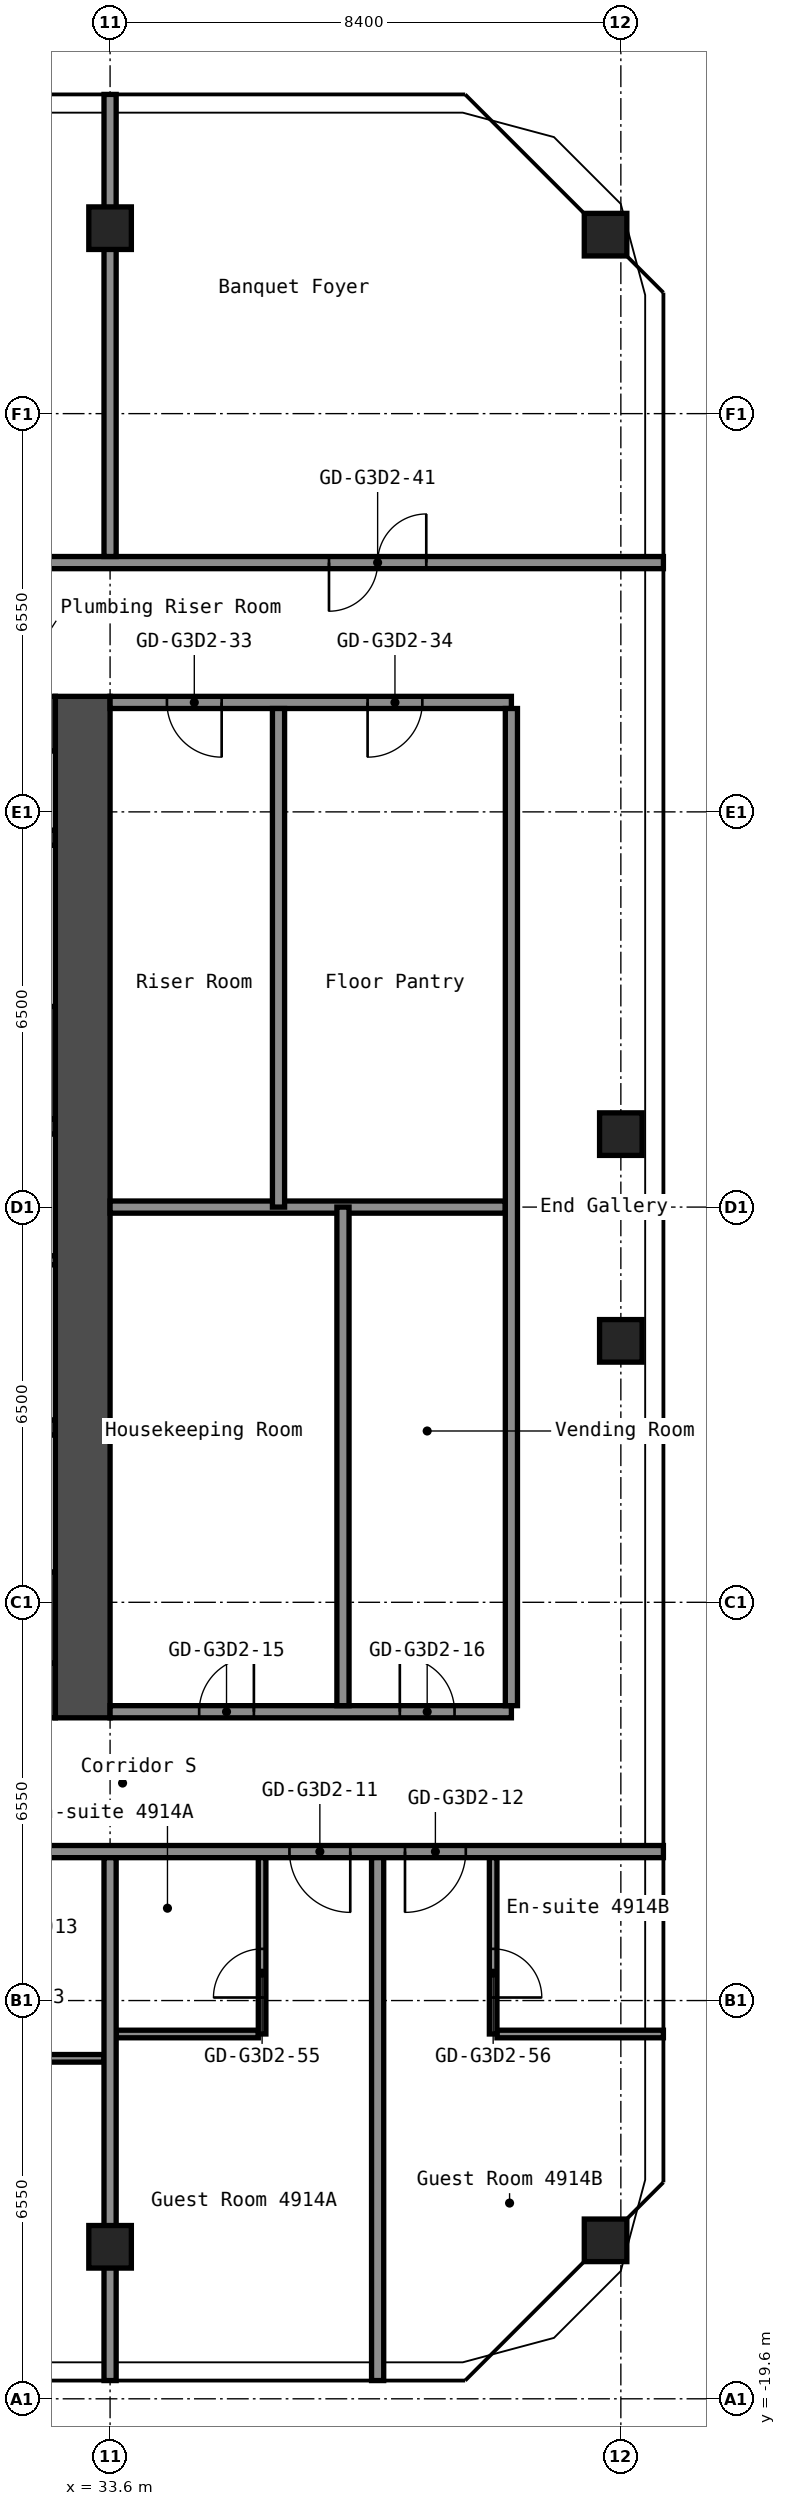
"""IFC4 building model, lengths in metres.
Left out: names, types, materials, properties, quantities, classifications, styles, units other than length and angle.
Written with IfcOpenShell. Run it as: python <this file> out.ifc"""

import sys

from ifc_helpers import new_model, si_unit, direction, frame, frame_2d, origin, origin_2d, place, context, subcontext, project, spatial, rectangle, hollow_rectangle, extrude, element, fill, save


model = new_model("IFC4")
c1 = context("Model", 3, precision=1e-05, world=origin(), true_north=direction((0.0, 1.0)))
c2 = subcontext(c1, "Body", "Model", "MODEL_VIEW")
j1 = project(units=[si_unit("LENGTHUNIT", "METRE"), si_unit("PLANEANGLEUNIT", "RADIAN")], contexts=[c1])
p1 = place(None, origin())
s1 = spatial("IfcSite", under=j1, at=p1, CompositionType="ELEMENT")
p2 = place(p1, origin())
s2 = spatial("IfcBuilding", under=s1, at=p2, CompositionType="ELEMENT")
p3 = place(p2, frame((0.0, 0.0, 172.6)))
s3 = spatial("IfcBuildingStorey", under=s2, at=p3, CompositionType="ELEMENT", Elevation=172.6)
for number, where, z_axis, x_axis in (
    (1, (33.6, -17.1, 0.0), (0.0, 0.0, 1.0), (1.0, 0.0, 0.0)),
    (2, (33.6, 16.1, 0.0), (0.0, 0.0, 1.0), (1.0, 0.0, 0.0)),
    (3, (41.749, -16.994, 0.0), (0.0, 0.0, 1.0), (1.0, 0.0, 0.0)),
    (4, (42.0, -2.2, 0.0), (0.0, 0.0, 1.0), (1.0, 0.0, 0.0)),
    (5, (42.0, 1.2, 0.0), (0.0, 0.0, 1.0), (1.0, 0.0, 0.0)),
    (6, (41.749, 15.994, 0.0), (0.0, 0.0, 1.0), (1.0, 0.0, 0.0)),
):
    element("IfcColumn", number, at=place(p3, frame(where, z_axis=z_axis, x_axis=x_axis)), inside=s3, PredefinedType="COLUMN", context=c2, shape_type="SweptSolid", body=[
        extrude(hollow_rectangle(XDim=0.7, YDim=0.7, WallThickness=0.028, at=origin_2d()), origin(), (0.0, 0.0, 1.0), 2.9),
    ])
p4 = place(p3, frame((33.15, -8.4, 0.0), z_axis=(0.0, 0.0, 1.0), x_axis=(0.0, 1.0, 0.0)))
e7 = element("IfcWall", 7, at=p4, inside=s3, PredefinedType="SHEAR", context=c2, shape_type="SweptSolid", body=[
    extrude(rectangle(XDim=16.8, YDim=0.9, at=frame_2d((8.4, 0.0))), origin(), (0.0, 0.0, 1.0), 2.9),
])
p5 = place(p3, frame((17.7, 7.95, 0.0), z_axis=(0.0, 0.0, 1.0), x_axis=(1.0, 0.0, 0.0)))
e8 = element("IfcWall", 8, at=p5, inside=s3, PredefinedType="SHEAR", context=c2, shape_type="SweptSolid", body=[
    extrude(rectangle(XDim=15.0, YDim=0.9, at=frame_2d((7.5, 0.0))), origin(), (0.0, 0.0, 1.0), 2.9),
])
p6 = place(p5, frame((10.4, 0.0, 0.0)))
e9 = element("IfcOpeningElement", 9, at=p6, cuts=e8, PredefinedType="OPENING", context=c2, shape_type="SweptSolid", body=[
    extrude(rectangle(XDim=1.2, YDim=2.1, at=frame_2d((0.6, 1.05))), frame((0.0, 0.46, 0.0), z_axis=(0.0, -1.0, 0.0), x_axis=(1.0, 0.0, 0.0)), (0.0, 0.0, 1.0), 0.92),
])
p7 = place(p5, frame((13.35, 0.0, 0.0)))
e10 = element("IfcOpeningElement", 10, at=p7, cuts=e8, PredefinedType="OPENING", context=c2, shape_type="SweptSolid", body=[
    extrude(rectangle(XDim=0.9, YDim=2.1, at=frame_2d((0.45, 1.05))), frame((0.0, 0.46, 0.0), z_axis=(0.0, -1.0, 0.0), x_axis=(1.0, 0.0, 0.0)), (0.0, 0.0, 1.0), 0.92),
])
p8 = place(p3, frame((17.7, -7.95, 0.0), z_axis=(0.0, 0.0, 1.0), x_axis=(1.0, 0.0, 0.0)))
e11 = element("IfcWall", 11, at=p8, inside=s3, PredefinedType="SHEAR", context=c2, shape_type="SweptSolid", body=[
    extrude(rectangle(XDim=15.0, YDim=0.9, at=frame_2d((7.5, 0.0))), origin(), (0.0, 0.0, 1.0), 2.9),
])
p9 = place(p8, frame((2.55, 0.0, 0.0)))
e12 = element("IfcOpeningElement", 12, at=p9, cuts=e11, PredefinedType="OPENING", context=c2, shape_type="SweptSolid", body=[
    extrude(rectangle(XDim=1.0, YDim=2.1, at=frame_2d((0.5, 1.05))), frame((0.0, 0.46, 0.0), z_axis=(0.0, -1.0, 0.0), x_axis=(1.0, 0.0, 0.0)), (0.0, 0.0, 1.0), 0.92),
])
p10 = place(p3, frame((27.65, 1.325, 0.0), z_axis=(0.0, 0.0, 1.0), x_axis=(1.0, 0.0, 0.0)))
e13 = element("IfcWall", 13, at=p10, inside=s3, PredefinedType="SHEAR", context=c2, shape_type="SweptSolid", body=[
    extrude(rectangle(XDim=5.05, YDim=0.25, at=frame_2d((2.525, 0.0))), origin(), (0.0, 0.0, 1.0), 2.9),
])
p11 = place(p10, frame((0.55, 0.0, 0.0)))
e14 = element("IfcOpeningElement", 14, at=p11, cuts=e13, PredefinedType="OPENING", context=c2, shape_type="SweptSolid", body=[
    extrude(rectangle(XDim=1.2, YDim=2.1, at=frame_2d((0.6, 1.05))), frame((0.0, 0.135, 0.0), z_axis=(0.0, -1.0, 0.0), x_axis=(1.0, 0.0, 0.0)), (0.0, 0.0, 1.0), 0.27),
])
p12 = place(p3, frame((30.3, 2.375, 0.0), z_axis=(0.0, 0.0, 1.0), x_axis=(1.0, 0.0, 0.0)))
e15 = element("IfcWall", 15, at=p12, inside=s3, PredefinedType="SHEAR", context=c2, shape_type="SweptSolid", body=[
    extrude(rectangle(XDim=2.4, YDim=1.85, at=frame_2d((1.2, 0.0))), origin(), (0.0, 0.0, 1.0), 2.9),
])
p13 = place(p3, frame((30.3, 6.075, 0.0), z_axis=(0.0, 0.0, 1.0), x_axis=(1.0, 0.0, 0.0)))
e16 = element("IfcWall", 16, at=p13, inside=s3, PredefinedType="SHEAR", context=c2, shape_type="SweptSolid", body=[
    extrude(rectangle(XDim=2.4, YDim=0.25, at=frame_2d((1.2, 0.0))), origin(), (0.0, 0.0, 1.0), 2.9),
])
p14 = place(p3, frame((28.15, -3.625, 0.0), z_axis=(0.0, 0.0, 1.0), x_axis=(1.0, 0.0, 0.0)))
e17 = element("IfcWall", 17, at=p14, inside=s3, PredefinedType="SHEAR", context=c2, shape_type="SweptSolid", body=[
    extrude(rectangle(XDim=4.55, YDim=0.25, at=frame_2d((2.275, 0.0))), origin(), (0.0, 0.0, 1.0), 2.9),
])
p15 = place(p3, frame((28.15, -6.75, 0.0), z_axis=(0.0, 0.0, 1.0), x_axis=(1.0, 0.0, 0.0)))
e18 = element("IfcWall", 18, at=p15, inside=s3, PredefinedType="SHEAR", context=c2, shape_type="SweptSolid", body=[
    extrude(rectangle(XDim=4.55, YDim=1.5, at=frame_2d((2.275, 0.0))), origin(), (0.0, 0.0, 1.0), 2.9),
])
p16 = place(p3, frame((30.4, -0.875, 0.0), z_axis=(0.0, 0.0, 1.0), x_axis=(1.0, 0.0, 0.0)))
e19 = element("IfcWall", 19, at=p16, inside=s3, PredefinedType="PARTITIONING", context=c2, shape_type="SweptSolid", body=[
    extrude(rectangle(XDim=2.3, YDim=0.15, at=frame_2d((1.15, 0.0))), origin(), (0.0, 0.0, 1.0), 2.9),
])
p17 = place(p3, frame((30.262, -14.0, 0.0), z_axis=(0.0, 0.0, 1.0), x_axis=(1.0, 0.0, 0.0)))
e20 = element("IfcWall", 20, at=p17, inside=s3, PredefinedType="PARTITIONING", context=c2, shape_type="SweptSolid", body=[
    extrude(rectangle(XDim=3.238, YDim=0.125, at=frame_2d((1.619, 0.0))), origin(), (0.0, 0.0, 1.0), 2.9),
])
p18 = place(p17, frame((1.238, 0.0, 0.0)))
e21 = element("IfcOpeningElement", 21, at=p18, cuts=e20, PredefinedType="OPENING", context=c2, shape_type="SweptSolid", body=[
    extrude(rectangle(XDim=0.8, YDim=2.1, at=frame_2d((0.4, 1.05))), frame((0.0, 0.073, 0.0), z_axis=(0.0, -1.0, 0.0), x_axis=(1.0, 0.0, 0.0)), (0.0, 0.0, 1.0), 0.145),
])
p19 = place(p3, frame((33.7, -13.6, 0.0), z_axis=(0.0, 0.0, 1.0), x_axis=(1.0, 0.0, 0.0)))
e22 = element("IfcWall", 22, at=p19, inside=s3, PredefinedType="PARTITIONING", context=c2, shape_type="SweptSolid", body=[
    extrude(rectangle(XDim=2.338, YDim=0.125, at=frame_2d((1.169, 0.0))), origin(), (0.0, 0.0, 1.0), 2.9),
])
p20 = place(p3, frame((39.962, -13.6, 0.0), z_axis=(0.0, 0.0, 1.0), x_axis=(1.0, 0.0, 0.0)))
e23 = element("IfcWall", 23, at=p20, inside=s3, PredefinedType="PARTITIONING", context=c2, shape_type="SweptSolid", body=[
    extrude(rectangle(XDim=2.738, YDim=0.125, at=frame_2d((1.369, 0.0))), origin(), (0.0, 0.0, 1.0), 2.9),
])
p21 = place(p3, frame((16.8, -10.6, 0.0), z_axis=(0.0, 0.0, 1.0), x_axis=(1.0, 0.0, 0.0)))
e24 = element("IfcWall", 24, at=p21, inside=s3, PredefinedType="PARTITIONING", context=c2, shape_type="SweptSolid", body=[
    extrude(rectangle(XDim=25.9, YDim=0.2, at=frame_2d((12.95, 0.0))), origin(), (0.0, 0.0, 1.0), 2.9),
])
p22 = place(p21, frame((2.85, 0.0, 0.0)))
e25 = element("IfcOpeningElement", 25, at=p22, cuts=e24, PredefinedType="OPENING", context=c2, shape_type="SweptSolid", body=[
    extrude(rectangle(XDim=1.0, YDim=2.1, at=frame_2d((0.5, 1.05))), frame((0.0, 0.11, 0.0), z_axis=(0.0, -1.0, 0.0), x_axis=(1.0, 0.0, 0.0)), (0.0, 0.0, 1.0), 0.22),
])
p23 = place(p21, frame((4.55, 0.0, 0.0)))
e26 = element("IfcOpeningElement", 26, at=p23, cuts=e24, PredefinedType="OPENING", context=c2, shape_type="SweptSolid", body=[
    extrude(rectangle(XDim=1.0, YDim=2.1, at=frame_2d((0.5, 1.05))), frame((0.0, 0.11, 0.0), z_axis=(0.0, -1.0, 0.0), x_axis=(1.0, 0.0, 0.0)), (0.0, 0.0, 1.0), 0.22),
])
p24 = place(p21, frame((10.4, 0.0, 0.0)))
e27 = element("IfcOpeningElement", 27, at=p24, cuts=e24, PredefinedType="OPENING", context=c2, shape_type="SweptSolid", body=[
    extrude(rectangle(XDim=1.0, YDim=2.1, at=frame_2d((0.5, 1.05))), frame((0.0, 0.11, 0.0), z_axis=(0.0, -1.0, 0.0), x_axis=(1.0, 0.0, 0.0)), (0.0, 0.0, 1.0), 0.22),
])
p25 = place(p21, frame((19.75, 0.0, 0.0)))
e28 = element("IfcOpeningElement", 28, at=p25, cuts=e24, PredefinedType="OPENING", context=c2, shape_type="SweptSolid", body=[
    extrude(rectangle(XDim=1.0, YDim=2.1, at=frame_2d((0.5, 1.05))), frame((0.0, 0.11, 0.0), z_axis=(0.0, -1.0, 0.0), x_axis=(1.0, 0.0, 0.0)), (0.0, 0.0, 1.0), 0.22),
])
p26 = place(p21, frame((21.65, 0.0, 0.0)))
e29 = element("IfcOpeningElement", 29, at=p26, cuts=e24, PredefinedType="OPENING", context=c2, shape_type="SweptSolid", body=[
    extrude(rectangle(XDim=1.0, YDim=2.1, at=frame_2d((0.5, 1.05))), frame((0.0, 0.11, 0.0), z_axis=(0.0, -1.0, 0.0), x_axis=(1.0, 0.0, 0.0)), (0.0, 0.0, 1.0), 0.22),
])
p27 = place(p3, frame((33.6, -8.3, 0.0), z_axis=(0.0, 0.0, 1.0), x_axis=(1.0, 0.0, 0.0)))
e30 = element("IfcWall", 30, at=p27, inside=s3, PredefinedType="PARTITIONING", context=c2, shape_type="SweptSolid", body=[
    extrude(rectangle(XDim=6.6, YDim=0.2, at=frame_2d((3.3, 0.0))), origin(), (0.0, 0.0, 1.0), 2.9),
])
p28 = place(p27, frame((1.465, 0.0, 0.0)))
e31 = element("IfcOpeningElement", 31, at=p28, cuts=e30, PredefinedType="OPENING", context=c2, shape_type="SweptSolid", body=[
    extrude(rectangle(XDim=0.9, YDim=2.1, at=frame_2d((0.45, 1.05))), frame((0.0, 0.11, 0.0), z_axis=(0.0, -1.0, 0.0), x_axis=(1.0, 0.0, 0.0)), (0.0, 0.0, 1.0), 0.22),
])
p29 = place(p27, frame((4.765, 0.0, 0.0)))
e32 = element("IfcOpeningElement", 32, at=p29, cuts=e30, PredefinedType="OPENING", context=c2, shape_type="SweptSolid", body=[
    extrude(rectangle(XDim=0.9, YDim=2.1, at=frame_2d((0.45, 1.05))), frame((0.0, 0.11, 0.0), z_axis=(0.0, -1.0, 0.0), x_axis=(1.0, 0.0, 0.0)), (0.0, 0.0, 1.0), 0.22),
])
p30 = place(p3, frame((33.6, 0.0, 0.0), z_axis=(0.0, 0.0, 1.0), x_axis=(1.0, 0.0, 0.0)))
e33 = element("IfcWall", 33, at=p30, inside=s3, PredefinedType="PARTITIONING", context=c2, shape_type="SweptSolid", body=[
    extrude(rectangle(XDim=6.5, YDim=0.2, at=frame_2d((3.25, 0.0))), origin(), (0.0, 0.0, 1.0), 2.9),
])
p31 = place(p3, frame((33.6, 8.3, 0.0), z_axis=(0.0, 0.0, 1.0), x_axis=(1.0, 0.0, 0.0)))
e34 = element("IfcWall", 34, at=p31, inside=s3, PredefinedType="PARTITIONING", context=c2, shape_type="SweptSolid", body=[
    extrude(rectangle(XDim=6.6, YDim=0.2, at=frame_2d((3.3, 0.0))), origin(), (0.0, 0.0, 1.0), 2.9),
])
p32 = place(p31, frame((0.935, 0.0, 0.0)))
e35 = element("IfcOpeningElement", 35, at=p32, cuts=e34, PredefinedType="OPENING", context=c2, shape_type="SweptSolid", body=[
    extrude(rectangle(XDim=0.9, YDim=2.1, at=frame_2d((0.45, 1.05))), frame((0.0, 0.11, 0.0), z_axis=(0.0, -1.0, 0.0), x_axis=(1.0, 0.0, 0.0)), (0.0, 0.0, 1.0), 0.22),
])
p33 = place(p31, frame((4.235, 0.0, 0.0)))
e36 = element("IfcOpeningElement", 36, at=p33, cuts=e34, PredefinedType="OPENING", context=c2, shape_type="SweptSolid", body=[
    extrude(rectangle(XDim=0.9, YDim=2.1, at=frame_2d((0.45, 1.05))), frame((0.0, 0.11, 0.0), z_axis=(0.0, -1.0, 0.0), x_axis=(1.0, 0.0, 0.0)), (0.0, 0.0, 1.0), 0.22),
])
p34 = place(p3, frame((16.8, 10.6, 0.0), z_axis=(0.0, 0.0, 1.0), x_axis=(1.0, 0.0, 0.0)))
e37 = element("IfcWall", 37, at=p34, inside=s3, PredefinedType="PARTITIONING", context=c2, shape_type="SweptSolid", body=[
    extrude(rectangle(XDim=25.9, YDim=0.2, at=frame_2d((12.95, 0.0))), origin(), (0.0, 0.0, 1.0), 2.9),
])
p35 = place(p34, frame((3.4, 0.0, 0.0)))
e38 = element("IfcOpeningElement", 38, at=p35, cuts=e37, PredefinedType="OPENING", context=c2, shape_type="SweptSolid", body=[
    extrude(rectangle(XDim=1.6, YDim=2.1, at=frame_2d((0.8, 1.05))), frame((0.0, 0.11, 0.0), z_axis=(0.0, -1.0, 0.0), x_axis=(1.0, 0.0, 0.0)), (0.0, 0.0, 1.0), 0.22),
])
p36 = place(p34, frame((11.8, 0.0, 0.0)))
e39 = element("IfcOpeningElement", 39, at=p36, cuts=e37, PredefinedType="OPENING", context=c2, shape_type="SweptSolid", body=[
    extrude(rectangle(XDim=1.6, YDim=2.1, at=frame_2d((0.8, 1.05))), frame((0.0, 0.11, 0.0), z_axis=(0.0, -1.0, 0.0), x_axis=(1.0, 0.0, 0.0)), (0.0, 0.0, 1.0), 0.22),
])
p37 = place(p34, frame((20.4, 0.0, 0.0)))
e40 = element("IfcOpeningElement", 40, at=p37, cuts=e37, PredefinedType="OPENING", context=c2, shape_type="SweptSolid", body=[
    extrude(rectangle(XDim=1.6, YDim=2.1, at=frame_2d((0.8, 1.05))), frame((0.0, 0.11, 0.0), z_axis=(0.0, -1.0, 0.0), x_axis=(1.0, 0.0, 0.0)), (0.0, 0.0, 1.0), 0.22),
])
p38 = place(p3, frame((33.6, -19.3, 0.0), z_axis=(0.0, 0.0, 1.0), x_axis=(0.0, 1.0, 0.0)))
e41 = element("IfcWall", 41, at=p38, inside=s3, PredefinedType="PARTITIONING", context=c2, shape_type="SweptSolid", body=[
    extrude(rectangle(XDim=8.6, YDim=0.2, at=frame_2d((4.3, 0.0))), origin(), (0.0, 0.0, 1.0), 2.9),
])
p39 = place(p3, frame((33.6, 10.7, 0.0), z_axis=(0.0, 0.0, 1.0), x_axis=(0.0, 1.0, 0.0)))
e42 = element("IfcWall", 42, at=p39, inside=s3, PredefinedType="PARTITIONING", context=c2, shape_type="SweptSolid", body=[
    extrude(rectangle(XDim=7.6, YDim=0.2, at=frame_2d((3.8, 0.0))), origin(), (0.0, 0.0, 1.0), 2.9),
])
p40 = place(p3, frame((36.1, -13.6, 0.0), z_axis=(0.0, 0.0, 1.0), x_axis=(0.0, 1.0, 0.0)))
e43 = element("IfcWall", 43, at=p40, inside=s3, PredefinedType="PARTITIONING", context=c2, shape_type="SweptSolid", body=[
    extrude(rectangle(XDim=2.9, YDim=0.125, at=frame_2d((1.45, 0.0))), origin(), (0.0, 0.0, 1.0), 2.9),
])
p41 = place(p40, frame((0.6, 0.0, 0.0)))
e44 = element("IfcOpeningElement", 44, at=p41, cuts=e43, PredefinedType="OPENING", context=c2, shape_type="SweptSolid", body=[
    extrude(rectangle(XDim=0.8, YDim=2.1, at=frame_2d((0.4, 1.05))), frame((0.0, 0.073, 0.0), z_axis=(0.0, -1.0, 0.0), x_axis=(1.0, 0.0, 0.0)), (0.0, 0.0, 1.0), 0.145),
])
for number, where, z_axis, x_axis in (
    (45, (36.37, 0.0, 0.0), (0.0, 0.0, 1.0), (0.0, 1.0, 0.0)),
    (46, (37.43, -8.2, 0.0), (0.0, 0.0, 1.0), (0.0, 1.0, 0.0)),
):
    element("IfcWall", number, at=place(p3, frame(where, z_axis=z_axis, x_axis=x_axis)), inside=s3, PredefinedType="PARTITIONING", context=c2, shape_type="SweptSolid", body=[
        extrude(rectangle(XDim=8.2, YDim=0.2, at=frame_2d((4.1, 0.0))), origin(), (0.0, 0.0, 1.0), 2.9),
    ])
p42 = place(p3, frame((38.0, -19.3, 0.0), z_axis=(0.0, 0.0, 1.0), x_axis=(0.0, 1.0, 0.0)))
e47 = element("IfcWall", 47, at=p42, inside=s3, PredefinedType="PARTITIONING", context=c2, shape_type="SweptSolid", body=[
    extrude(rectangle(XDim=8.6, YDim=0.2, at=frame_2d((4.3, 0.0))), origin(), (0.0, 0.0, 1.0), 2.9),
])
p43 = place(p3, frame((39.9, -13.6, 0.0), z_axis=(0.0, 0.0, 1.0), x_axis=(0.0, 1.0, 0.0)))
e48 = element("IfcWall", 48, at=p43, inside=s3, PredefinedType="PARTITIONING", context=c2, shape_type="SweptSolid", body=[
    extrude(rectangle(XDim=2.9, YDim=0.125, at=frame_2d((1.45, 0.0))), origin(), (0.0, 0.0, 1.0), 2.9),
])
p44 = place(p43, frame((0.6, 0.0, 0.0)))
e49 = element("IfcOpeningElement", 49, at=p44, cuts=e48, PredefinedType="OPENING", context=c2, shape_type="SweptSolid", body=[
    extrude(rectangle(XDim=0.8, YDim=2.1, at=frame_2d((0.4, 1.05))), frame((0.0, 0.073, 0.0), z_axis=(0.0, -1.0, 0.0), x_axis=(1.0, 0.0, 0.0)), (0.0, 0.0, 1.0), 0.145),
])
p45 = place(p3, frame((40.2, -8.2, 0.0), z_axis=(0.0, 0.0, 1.0), x_axis=(0.0, 1.0, 0.0)))
e50 = element("IfcWall", 50, at=p45, inside=s3, PredefinedType="PARTITIONING", context=c2, shape_type="SweptSolid", body=[
    extrude(rectangle(XDim=16.4, YDim=0.2, at=frame_2d((8.2, 0.0))), origin(), (0.0, 0.0, 1.0), 2.9),
])
p46 = place(p25, origin())
e51 = element("IfcDoor", 51, at=p46, inside=s3, OperationType="SINGLE_SWING_RIGHT", PredefinedType="DOOR", context=c2, shape_type="SweptSolid", body=[
    extrude(rectangle(XDim=1.0, YDim=2.1, at=frame_2d((0.5, 1.05))), frame((0.0, 0.025, 0.0), z_axis=(0.0, -1.0, 0.0), x_axis=(1.0, 0.0, 0.0)), (0.0, 0.0, 1.0), 0.05),
])
fill(e28, e51)
p47 = place(p26, origin())
e52 = element("IfcDoor", 52, at=p47, inside=s3, OperationType="SINGLE_SWING_LEFT", PredefinedType="DOOR", context=c2, shape_type="SweptSolid", body=[
    extrude(rectangle(XDim=1.0, YDim=2.1, at=frame_2d((0.5, 1.05))), frame((0.0, 0.025, 0.0), z_axis=(0.0, -1.0, 0.0), x_axis=(1.0, 0.0, 0.0)), (0.0, 0.0, 1.0), 0.05),
])
fill(e29, e52)
p48 = place(p28, origin())
e53 = element("IfcDoor", 53, at=p48, inside=s3, OperationType="SINGLE_SWING_LEFT", PredefinedType="DOOR", context=c2, shape_type="SweptSolid", body=[
    extrude(rectangle(XDim=0.9, YDim=2.1, at=frame_2d((0.45, 1.05))), frame((0.0, 0.025, 0.0), z_axis=(0.0, -1.0, 0.0), x_axis=(1.0, 0.0, 0.0)), (0.0, 0.0, 1.0), 0.05),
])
fill(e31, e53)
p49 = place(p29, origin())
e54 = element("IfcDoor", 54, at=p49, inside=s3, OperationType="SINGLE_SWING_RIGHT", PredefinedType="DOOR", context=c2, shape_type="SweptSolid", body=[
    extrude(rectangle(XDim=0.9, YDim=2.1, at=frame_2d((0.45, 1.05))), frame((0.0, 0.025, 0.0), z_axis=(0.0, -1.0, 0.0), x_axis=(1.0, 0.0, 0.0)), (0.0, 0.0, 1.0), 0.05),
])
fill(e32, e54)
p50 = place(p32, origin())
e55 = element("IfcDoor", 55, at=p50, inside=s3, OperationType="SINGLE_SWING_RIGHT", PredefinedType="DOOR", context=c2, shape_type="SweptSolid", body=[
    extrude(rectangle(XDim=0.9, YDim=2.1, at=frame_2d((0.45, 1.05))), frame((0.0, 0.025, 0.0), z_axis=(0.0, -1.0, 0.0), x_axis=(1.0, 0.0, 0.0)), (0.0, 0.0, 1.0), 0.05),
])
fill(e35, e55)
p51 = place(p33, origin())
e56 = element("IfcDoor", 56, at=p51, inside=s3, OperationType="SINGLE_SWING_LEFT", PredefinedType="DOOR", context=c2, shape_type="SweptSolid", body=[
    extrude(rectangle(XDim=0.9, YDim=2.1, at=frame_2d((0.45, 1.05))), frame((0.0, 0.025, 0.0), z_axis=(0.0, -1.0, 0.0), x_axis=(1.0, 0.0, 0.0)), (0.0, 0.0, 1.0), 0.05),
])
fill(e36, e56)
p52 = place(p37, origin())
e57 = element("IfcDoor", 57, at=p52, inside=s3, OperationType="DOUBLE_DOOR_SINGLE_SWING", PredefinedType="DOOR", context=c2, shape_type="SweptSolid", body=[
    extrude(rectangle(XDim=1.6, YDim=2.1, at=frame_2d((0.8, 1.05))), frame((0.0, 0.025, 0.0), z_axis=(0.0, -1.0, 0.0), x_axis=(1.0, 0.0, 0.0)), (0.0, 0.0, 1.0), 0.05),
])
fill(e40, e57)
p53 = place(p41, origin())
e58 = element("IfcDoor", 58, at=p53, inside=s3, OperationType="SINGLE_SWING_RIGHT", PredefinedType="DOOR", context=c2, shape_type="SweptSolid", body=[
    extrude(rectangle(XDim=0.8, YDim=2.1, at=frame_2d((0.4, 1.05))), frame((0.0, 0.025, 0.0), z_axis=(0.0, -1.0, 0.0), x_axis=(1.0, 0.0, 0.0)), (0.0, 0.0, 1.0), 0.05),
])
fill(e44, e58)
p54 = place(p44, origin())
e59 = element("IfcDoor", 59, at=p54, inside=s3, OperationType="SINGLE_SWING_LEFT", PredefinedType="DOOR", context=c2, shape_type="SweptSolid", body=[
    extrude(rectangle(XDim=0.8, YDim=2.1, at=frame_2d((0.4, 1.05))), frame((0.0, 0.025, 0.0), z_axis=(0.0, -1.0, 0.0), x_axis=(1.0, 0.0, 0.0)), (0.0, 0.0, 1.0), 0.05),
])
fill(e49, e59)
save(model, sys.argv[1])
